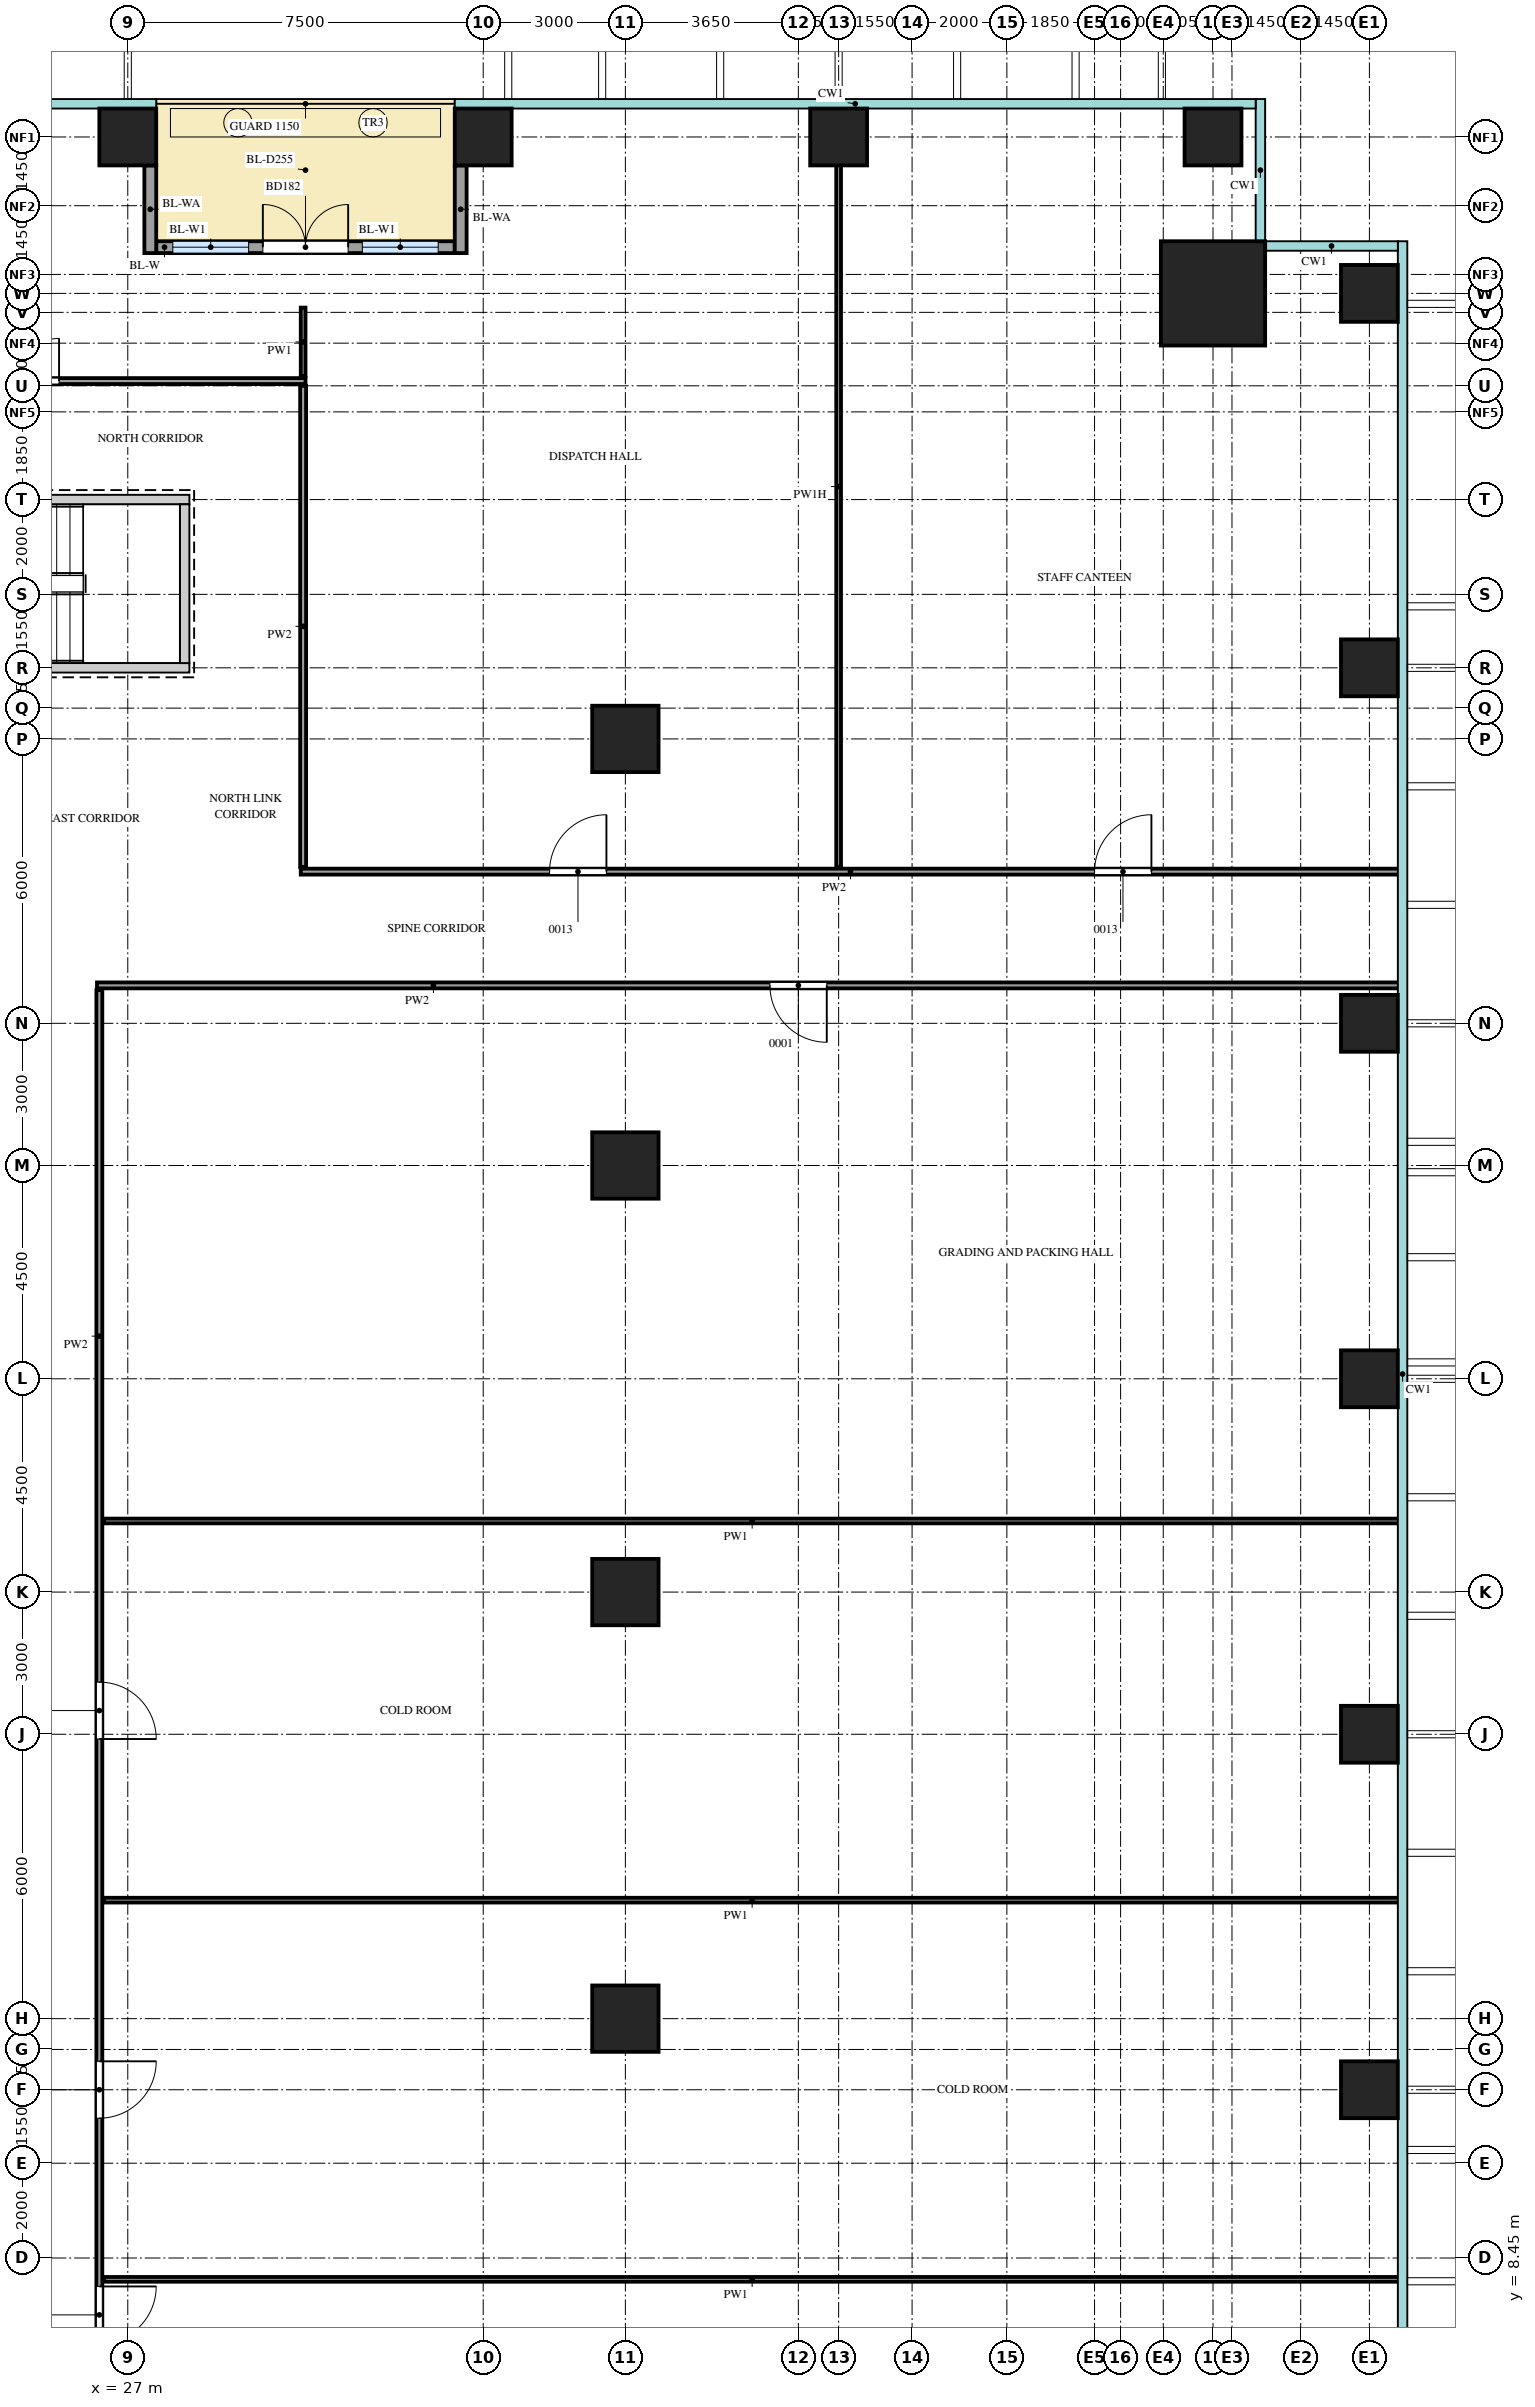
"""IFC4 building model, lengths in metres.
Left out: names, types, materials, properties, quantities, classifications, styles, units other than length and angle.
Written with IfcOpenShell. Run it as: python <this file> out.ifc"""

import sys

from ifc_helpers import new_model, si_unit, direction, frame, frame_2d, origin, origin_2d, place, context, subcontext, project, spatial, rectangle, extrude, source, transform, mapped, element, fill, save


model = new_model("IFC4")
c1 = context("Model", 3, precision=1e-05, world=origin(), true_north=direction((0.0, 1.0)))
c2 = subcontext(c1, "Body", "Model", "MODEL_VIEW")
j1 = project(units=[si_unit("LENGTHUNIT", "METRE"), si_unit("PLANEANGLEUNIT", "RADIAN")], contexts=[c1])
p1 = place(None, origin())
s1 = spatial("IfcSite", under=j1, at=p1, CompositionType="ELEMENT")
p2 = place(p1, origin())
s2 = spatial("IfcBuilding", under=s1, at=p2, CompositionType="ELEMENT")
p3 = place(p2, frame((0.0, 0.0, 87.0)))
s3 = spatial("IfcBuildingStorey", under=s2, at=p3, CompositionType="ELEMENT", Elevation=87.0)
m1 = source(origin(), c2, "Body", "SweptSolid", [
    extrude(rectangle(XDim=7.1, YDim=0.2, at=frame_2d((3.55, 0.0))), origin(), (0.0, 0.0, 1.0), 4.2),
])
p4 = place(p3, frame((21.2, 45.55, 0.0), z_axis=(0.0, 0.0, 1.0), x_axis=(1.0, 0.0, 0.0)))
e1 = element("IfcWall", 1, at=p4, inside=s3, PredefinedType="SHEAR", context=c2, shape_type="MappedRepresentation", body=[
    mapped(m1, transform((0.0, 0.0, 0.0))),
])
m2 = source(origin(), c2, "Body", "SweptSolid", [
    extrude(rectangle(XDim=1.2, YDim=2.1, at=frame_2d((0.6, 1.05))), frame((0.0, 0.11, 0.0), z_axis=(0.0, -1.0, 0.0), x_axis=(1.0, 0.0, 0.0)), (0.0, 0.0, 1.0), 0.22),
])
p5 = place(p4, frame((0.15, 0.0, 0.0)))
e2 = element("IfcOpeningElement", 2, at=p5, cuts=e1, PredefinedType="OPENING", context=c2, shape_type="MappedRepresentation", body=[
    mapped(m2, transform((0.0, 0.0, 0.0))),
])
p6 = place(p3, frame((21.2, 42.0, 0.0), z_axis=(0.0, 0.0, 1.0), x_axis=(1.0, 0.0, 0.0)))
e3 = element("IfcWall", 3, at=p6, inside=s3, PredefinedType="SHEAR", context=c2, shape_type="MappedRepresentation", body=[
    mapped(m1, transform((0.0, 0.0, 0.0))),
])
m3 = source(origin(), c2, "Body", "SweptSolid", [
    extrude(rectangle(XDim=3.35, YDim=0.2, at=frame_2d((1.675, 0.0))), origin(), (0.0, 0.0, 1.0), 4.2),
])
p7 = place(p3, frame((28.2, 42.1, 0.0), z_axis=(0.0, 0.0, 1.0), x_axis=(0.0, 1.0, 0.0)))
e4 = element("IfcWall", 4, at=p7, inside=s3, PredefinedType="SHEAR", context=c2, shape_type="MappedRepresentation", body=[
    mapped(m3, transform((0.0, 0.0, 0.0))),
])
m4 = source(origin(), c2, "Body", "SweptSolid", [
    extrude(rectangle(XDim=2.2, YDim=2.2, at=origin_2d()), origin(), (0.0, 0.0, 1.0), 4.5),
])
p8 = place(p3, frame((49.9, 49.9, 0.0), z_axis=(0.0, 0.0, 1.0), x_axis=(1.0, 0.0, 0.0)))
e5 = element("IfcColumn", 5, at=p8, inside=s3, PredefinedType="COLUMN", context=c2, shape_type="MappedRepresentation", body=[
    mapped(m4, transform((0.0, 0.0, 0.0))),
])
m5 = source(origin(), c2, "Body", "SweptSolid", [
    extrude(rectangle(XDim=1.2, YDim=1.2, at=origin_2d()), origin(), (0.0, 0.0, 1.0), 4.2),
])
for number, where, z_axis, x_axis in (
    (6, (53.2, 12.0, 0.0), (0.0, 0.0, 1.0), (1.0, 0.0, 0.0)),
    (7, (53.2, 19.5, 0.0), (0.0, 0.0, 1.0), (1.0, 0.0, 0.0)),
    (8, (53.2, 27.0, 0.0), (0.0, 0.0, 1.0), (1.0, 0.0, 0.0)),
    (9, (53.2, 34.5, 0.0), (0.0, 0.0, 1.0), (1.0, 0.0, 0.0)),
    (10, (53.2, 42.0, 0.0), (0.0, 0.0, 1.0), (1.0, 0.0, 0.0)),
    (11, (53.2, 49.9, 0.0), (0.0, 0.0, 1.0), (1.0, 0.0, 0.0)),
    (12, (27.0, 53.2, 0.0), (0.0, 0.0, 1.0), (1.0, 0.0, 0.0)),
    (13, (34.5, 53.2, 0.0), (0.0, 0.0, 1.0), (1.0, 0.0, 0.0)),
    (14, (42.0, 53.2, 0.0), (0.0, 0.0, 1.0), (1.0, 0.0, 0.0)),
    (15, (49.9, 53.2, 0.0), (0.0, 0.0, 1.0), (1.0, 0.0, 0.0)),
):
    element("IfcColumn", number, at=place(p3, frame(where, z_axis=z_axis, x_axis=x_axis)), inside=s3, PredefinedType="COLUMN", context=c2, shape_type="MappedRepresentation", body=[
        mapped(m5, transform((0.0, 0.0, 0.0))),
    ])
m6 = source(origin(), c2, "Body", "SweptSolid", [
    extrude(rectangle(XDim=1.4, YDim=1.4, at=origin_2d()), origin(), (0.0, 0.0, 1.0), 4.2),
])
for number, where, z_axis, x_axis in (
    (16, (37.5, 13.5, 0.0), (0.0, 0.0, 1.0), (1.0, 0.0, 0.0)),
    (17, (37.5, 22.5, 0.0), (0.0, 0.0, 1.0), (1.0, 0.0, 0.0)),
    (18, (37.5, 31.5, 0.0), (0.0, 0.0, 1.0), (1.0, 0.0, 0.0)),
    (19, (37.5, 40.5, 0.0), (0.0, 0.0, 1.0), (1.0, 0.0, 0.0)),
):
    element("IfcColumn", number, at=place(p3, frame(where, z_axis=z_axis, x_axis=x_axis)), inside=s3, PredefinedType="COLUMN", context=c2, shape_type="MappedRepresentation", body=[
        mapped(m6, transform((0.0, 0.0, 0.0))),
    ])
m7 = source(origin(), c2, "Body", "SweptSolid", [
    extrude(rectangle(XDim=6.3, YDim=0.25, at=frame_2d((3.15, 0.0))), origin(), (0.0, 0.0, 1.0), 4.2),
])
p9 = place(p3, frame((27.6, 50.875, 0.0), z_axis=(0.0, 0.0, 1.0), x_axis=(1.0, 0.0, 0.0)))
e20 = element("IfcWall", 20, at=p9, inside=s3, PredefinedType="SOLIDWALL", context=c2, shape_type="MappedRepresentation", body=[
    mapped(m7, transform((0.0, 0.0, 0.0))),
])
m8 = source(origin(), c2, "Body", "SweptSolid", [
    extrude(rectangle(XDim=1.6, YDim=2.4, at=frame_2d((0.8, 1.2))), frame((0.0, 0.135, 0.0), z_axis=(0.0, -1.0, 0.0), x_axis=(1.0, 0.0, 0.0)), (0.0, 0.0, 1.0), 0.27),
])
p10 = place(p9, frame((0.35, 0.0, 0.0)))
e21 = element("IfcOpeningElement", 21, at=p10, cuts=e20, PredefinedType="OPENING", context=c2, shape_type="MappedRepresentation", body=[
    mapped(m8, transform((0.0, 0.0, 0.0))),
])
p11 = place(p9, frame((4.35, 0.0, 0.0)))
e22 = element("IfcOpeningElement", 22, at=p11, cuts=e20, PredefinedType="OPENING", context=c2, shape_type="MappedRepresentation", body=[
    mapped(m8, transform((0.0, 0.0, 0.0))),
])
m9 = source(origin(), c2, "Body", "SweptSolid", [
    extrude(rectangle(XDim=1.8, YDim=2.4, at=frame_2d((0.9, 1.2))), frame((0.0, 0.135, 0.0), z_axis=(0.0, -1.0, 0.0), x_axis=(1.0, 0.0, 0.0)), (0.0, 0.0, 1.0), 0.27),
])
p12 = place(p9, frame((2.25, 0.0, 0.0)))
e23 = element("IfcOpeningElement", 23, at=p12, cuts=e20, PredefinedType="OPENING", context=c2, shape_type="MappedRepresentation", body=[
    mapped(m9, transform((0.0, 0.0, 0.0))),
])
m10 = source(origin(), c2, "Body", "SweptSolid", [
    extrude(rectangle(XDim=1.85, YDim=0.25, at=frame_2d((0.925, 0.0))), origin(), (0.0, 0.0, 1.0), 3.9),
])
for number, where, z_axis, x_axis in (
    (24, (27.475, 52.6, 0.0), (0.0, 0.0, 1.0), (0.0, -1.0, 0.0)),
    (25, (34.025, 52.6, 0.0), (0.0, 0.0, 1.0), (0.0, -1.0, 0.0)),
):
    element("IfcWall", number, at=place(p3, frame(where, z_axis=z_axis, x_axis=x_axis)), inside=s3, PredefinedType="SOLIDWALL", context=c2, shape_type="MappedRepresentation", body=[
        mapped(m10, transform((0.0, 0.0, 0.0))),
    ])
m11 = source(origin(), c2, "Body", "SweptSolid", [
    extrude(rectangle(XDim=29.05, YDim=0.125, at=frame_2d((14.525, 0.0))), origin(), (0.0, 0.0, 1.0), 4.3),
])
p13 = place(p3, frame((26.4, 6.15, 0.0), z_axis=(0.0, 0.0, 1.0), x_axis=(0.0, 1.0, 0.0)))
e26 = element("IfcWall", 26, at=p13, inside=s3, PredefinedType="PARTITIONING", context=c2, shape_type="MappedRepresentation", body=[
    mapped(m11, transform((0.0, 0.0, 0.0))),
])
m12 = source(origin(), c2, "Body", "SweptSolid", [
    extrude(rectangle(XDim=1.2, YDim=2.1, at=frame_2d((0.6, 1.05))), frame((0.0, 0.073, 0.0), z_axis=(0.0, -1.0, 0.0), x_axis=(1.0, 0.0, 0.0)), (0.0, 0.0, 1.0), 0.145),
])
p14 = place(p13, frame((0.5, 0.0, 0.0)))
e27 = element("IfcOpeningElement", 27, at=p14, cuts=e26, PredefinedType="OPENING", context=c2, shape_type="MappedRepresentation", body=[
    mapped(m12, transform((0.0, 0.0, 0.0))),
])
p15 = place(p13, frame((5.25, 0.0, 0.0)))
e28 = element("IfcOpeningElement", 28, at=p15, cuts=e26, PredefinedType="OPENING", context=c2, shape_type="MappedRepresentation", body=[
    mapped(m12, transform((0.0, 0.0, 0.0))),
])
p16 = place(p13, frame((13.25, 0.0, 0.0)))
e29 = element("IfcOpeningElement", 29, at=p16, cuts=e26, PredefinedType="OPENING", context=c2, shape_type="MappedRepresentation", body=[
    mapped(m12, transform((0.0, 0.0, 0.0))),
])
m13 = source(origin(), c2, "Body", "SweptSolid", [
    extrude(rectangle(XDim=27.35, YDim=0.1, at=frame_2d((13.675, 0.0))), origin(), (0.0, 0.0, 1.0), 4.3),
])
for number, where, z_axis, x_axis in (
    (30, (26.5, 8.0, 0.0), (0.0, 0.0, 1.0), (1.0, 0.0, 0.0)),
    (31, (26.5, 16.0, 0.0), (0.0, 0.0, 1.0), (1.0, 0.0, 0.0)),
    (32, (26.5, 24.0, 0.0), (0.0, 0.0, 1.0), (1.0, 0.0, 0.0)),
):
    element("IfcWall", number, at=place(p3, frame(where, z_axis=z_axis, x_axis=x_axis)), inside=s3, PredefinedType="PARTITIONING", context=c2, shape_type="MappedRepresentation", body=[
        mapped(m13, transform((0.0, 0.0, 0.0))),
    ])
m14 = source(origin(), c2, "Body", "SweptSolid", [
    extrude(rectangle(XDim=27.5, YDim=0.125, at=frame_2d((13.75, 0.0))), origin(), (0.0, 0.0, 1.0), 4.3),
])
p17 = place(p3, frame((26.35, 35.3, 0.0), z_axis=(0.0, 0.0, 1.0), x_axis=(1.0, 0.0, 0.0)))
e33 = element("IfcWall", 33, at=p17, inside=s3, PredefinedType="PARTITIONING", context=c2, shape_type="MappedRepresentation", body=[
    mapped(m14, transform((0.0, 0.0, 0.0))),
])
p18 = place(p17, frame((14.2, 0.0, 0.0)))
e34 = element("IfcOpeningElement", 34, at=p18, cuts=e33, PredefinedType="OPENING", context=c2, shape_type="MappedRepresentation", body=[
    mapped(m12, transform((0.0, 0.0, 0.0))),
])
m15 = source(origin(), c2, "Body", "SweptSolid", [
    extrude(rectangle(XDim=23.2, YDim=0.125, at=frame_2d((11.6, 0.0))), origin(), (0.0, 0.0, 1.0), 4.3),
])
p19 = place(p3, frame((30.65, 37.7, 0.0), z_axis=(0.0, 0.0, 1.0), x_axis=(1.0, 0.0, 0.0)))
e35 = element("IfcWall", 35, at=p19, inside=s3, PredefinedType="PARTITIONING", context=c2, shape_type="MappedRepresentation", body=[
    mapped(m15, transform((0.0, 0.0, 0.0))),
])
p20 = place(p19, frame((5.25, 0.0, 0.0)))
e36 = element("IfcOpeningElement", 36, at=p20, cuts=e35, PredefinedType="OPENING", context=c2, shape_type="MappedRepresentation", body=[
    mapped(m12, transform((0.0, 0.0, 0.0))),
])
p21 = place(p19, frame((16.75, 0.0, 0.0)))
e37 = element("IfcOpeningElement", 37, at=p21, cuts=e35, PredefinedType="OPENING", context=c2, shape_type="MappedRepresentation", body=[
    mapped(m12, transform((0.0, 0.0, 0.0))),
])
m16 = source(origin(), c2, "Body", "SweptSolid", [
    extrude(rectangle(XDim=10.15, YDim=0.125, at=frame_2d((5.075, 0.0))), origin(), (0.0, 0.0, 1.0), 4.3),
])
p22 = place(p3, frame((30.7, 37.8, 0.0), z_axis=(0.0, 0.0, 1.0), x_axis=(0.0, 1.0, 0.0)))
e38 = element("IfcWall", 38, at=p22, inside=s3, PredefinedType="PARTITIONING", context=c2, shape_type="MappedRepresentation", body=[
    mapped(m16, transform((0.0, 0.0, 0.0))),
])
m17 = source(origin(), c2, "Body", "SweptSolid", [
    extrude(rectangle(XDim=16.05, YDim=0.1, at=frame_2d((8.025, 0.0))), origin(), (0.0, 0.0, 1.0), 3.7),
])
p23 = place(p3, frame((42.0, 37.8, 0.0), z_axis=(0.0, 0.0, 1.0), x_axis=(0.0, 1.0, 0.0)))
e39 = element("IfcWall", 39, at=p23, inside=s3, PredefinedType="PARTITIONING", context=c2, shape_type="MappedRepresentation", body=[
    mapped(m17, transform((0.0, 0.0, 0.0))),
])
m18 = source(origin(), c2, "Body", "SweptSolid", [
    extrude(rectangle(XDim=26.6, YDim=0.125, at=frame_2d((13.3, 0.0))), origin(), (0.0, 0.0, 1.0), 4.3),
])
p24 = place(p3, frame((4.15, 48.05, 0.0), z_axis=(0.0, 0.0, 1.0), x_axis=(1.0, 0.0, 0.0)))
e40 = element("IfcWall", 40, at=p24, inside=s3, PredefinedType="PARTITIONING", context=c2, shape_type="MappedRepresentation", body=[
    mapped(m18, transform((0.0, 0.0, 0.0))),
])
m19 = source(origin(), c2, "Body", "SweptSolid", [
    extrude(rectangle(XDim=0.9, YDim=2.1, at=frame_2d((0.45, 1.05))), frame((0.0, 0.073, 0.0), z_axis=(0.0, -1.0, 0.0), x_axis=(1.0, 0.0, 0.0)), (0.0, 0.0, 1.0), 0.145),
])
p25 = place(p24, frame((7.25, 0.0, 0.0)))
e41 = element("IfcOpeningElement", 41, at=p25, cuts=e40, PredefinedType="OPENING", context=c2, shape_type="MappedRepresentation", body=[
    mapped(m19, transform((0.0, 0.0, 0.0))),
])
p26 = place(p24, frame((20.5, 0.0, 0.0)))
e42 = element("IfcOpeningElement", 42, at=p26, cuts=e40, PredefinedType="OPENING", context=c2, shape_type="MappedRepresentation", body=[
    mapped(m19, transform((0.0, 0.0, 0.0))),
])
m20 = source(origin(), c2, "Body", "SweptSolid", [
    extrude(rectangle(XDim=1.45, YDim=0.1, at=frame_2d((0.725, 0.0))), origin(), (0.0, 0.0, 1.0), 4.3),
])
p27 = place(p3, frame((30.7, 48.15, 0.0), z_axis=(0.0, 0.0, 1.0), x_axis=(0.0, 1.0, 0.0)))
e43 = element("IfcWall", 43, at=p27, inside=s3, PredefinedType="PARTITIONING", context=c2, shape_type="MappedRepresentation", body=[
    mapped(m20, transform((0.0, 0.0, 0.0))),
])
m21 = source(origin(), c2, "Body", "SweptSolid", [
    extrude(rectangle(XDim=1.6, YDim=2.4, at=frame_2d((0.8, 1.2))), frame((0.0, 0.03, 0.0), z_axis=(0.0, -1.0, 0.0), x_axis=(1.0, 0.0, 0.0)), (0.0, 0.0, 1.0), 0.06),
])
p28 = place(p10, origin())
e44 = element("IfcWindow", 44, at=p28, inside=s3, PartitioningType="SINGLE_PANEL", PredefinedType="WINDOW", context=c2, shape_type="MappedRepresentation", body=[
    mapped(m21, transform((0.0, 0.0, 0.0))),
])
fill(e21, e44)
p29 = place(p11, origin())
e45 = element("IfcWindow", 45, at=p29, inside=s3, PartitioningType="SINGLE_PANEL", PredefinedType="WINDOW", context=c2, shape_type="MappedRepresentation", body=[
    mapped(m21, transform((0.0, 0.0, 0.0))),
])
fill(e22, e45)
m22 = source(origin(), c2, "Body", "SweptSolid", [
    extrude(rectangle(XDim=1.8, YDim=2.4, at=frame_2d((0.9, 1.2))), frame((0.0, 0.025, 0.0), z_axis=(0.0, -1.0, 0.0), x_axis=(1.0, 0.0, 0.0)), (0.0, 0.0, 1.0), 0.05),
])
p30 = place(p12, origin())
e46 = element("IfcDoor", 46, at=p30, inside=s3, OperationType="DOUBLE_DOOR_DOUBLE_SWING", PredefinedType="DOOR", context=c2, shape_type="MappedRepresentation", body=[
    mapped(m22, transform((0.0, 0.0, 0.0))),
])
fill(e23, e46)
m23 = source(origin(), c2, "Body", "SweptSolid", [
    extrude(rectangle(XDim=1.2, YDim=2.1, at=frame_2d((0.6, 1.05))), frame((0.0, 0.025, 0.0), z_axis=(0.0, -1.0, 0.0), x_axis=(1.0, 0.0, 0.0)), (0.0, 0.0, 1.0), 0.05),
])
p31 = place(p14, origin())
e47 = element("IfcDoor", 47, at=p31, inside=s3, OperationType="SINGLE_SWING_RIGHT", PredefinedType="DOOR", context=c2, shape_type="MappedRepresentation", body=[
    mapped(m23, transform((0.0, 0.0, 0.0))),
])
fill(e27, e47)
p32 = place(p15, origin())
e48 = element("IfcDoor", 48, at=p32, inside=s3, OperationType="SINGLE_SWING_RIGHT", PredefinedType="DOOR", context=c2, shape_type="MappedRepresentation", body=[
    mapped(m23, transform((0.0, 0.0, 0.0))),
])
fill(e28, e48)
p33 = place(p16, origin())
e49 = element("IfcDoor", 49, at=p33, inside=s3, OperationType="SINGLE_SWING_LEFT", PredefinedType="DOOR", context=c2, shape_type="MappedRepresentation", body=[
    mapped(m23, transform((0.0, 0.0, 0.0))),
])
fill(e29, e49)
p34 = place(p18, origin())
e50 = element("IfcDoor", 50, at=p34, inside=s3, OperationType="SINGLE_SWING_RIGHT", PredefinedType="DOOR", context=c2, shape_type="MappedRepresentation", body=[
    mapped(m23, transform((0.0, 0.0, 0.0))),
])
fill(e34, e50)
p35 = place(p20, origin())
e51 = element("IfcDoor", 51, at=p35, inside=s3, OperationType="SINGLE_SWING_LEFT", PredefinedType="DOOR", context=c2, shape_type="MappedRepresentation", body=[
    mapped(m23, transform((0.0, 0.0, 0.0))),
])
fill(e36, e51)
p36 = place(p21, origin())
e52 = element("IfcDoor", 52, at=p36, inside=s3, OperationType="SINGLE_SWING_LEFT", PredefinedType="DOOR", context=c2, shape_type="MappedRepresentation", body=[
    mapped(m23, transform((0.0, 0.0, 0.0))),
])
fill(e37, e52)
m24 = source(origin(), c2, "Body", "SweptSolid", [
    extrude(rectangle(XDim=0.9, YDim=2.1, at=frame_2d((0.45, 1.05))), frame((0.0, 0.025, 0.0), z_axis=(0.0, -1.0, 0.0), x_axis=(1.0, 0.0, 0.0)), (0.0, 0.0, 1.0), 0.05),
])
p37 = place(p26, origin())
e53 = element("IfcDoor", 53, at=p37, inside=s3, OperationType="SINGLE_SWING_LEFT", PredefinedType="DOOR", context=c2, shape_type="MappedRepresentation", body=[
    mapped(m24, transform((0.0, 0.0, 0.0))),
])
fill(e42, e53)
save(model, sys.argv[1])
